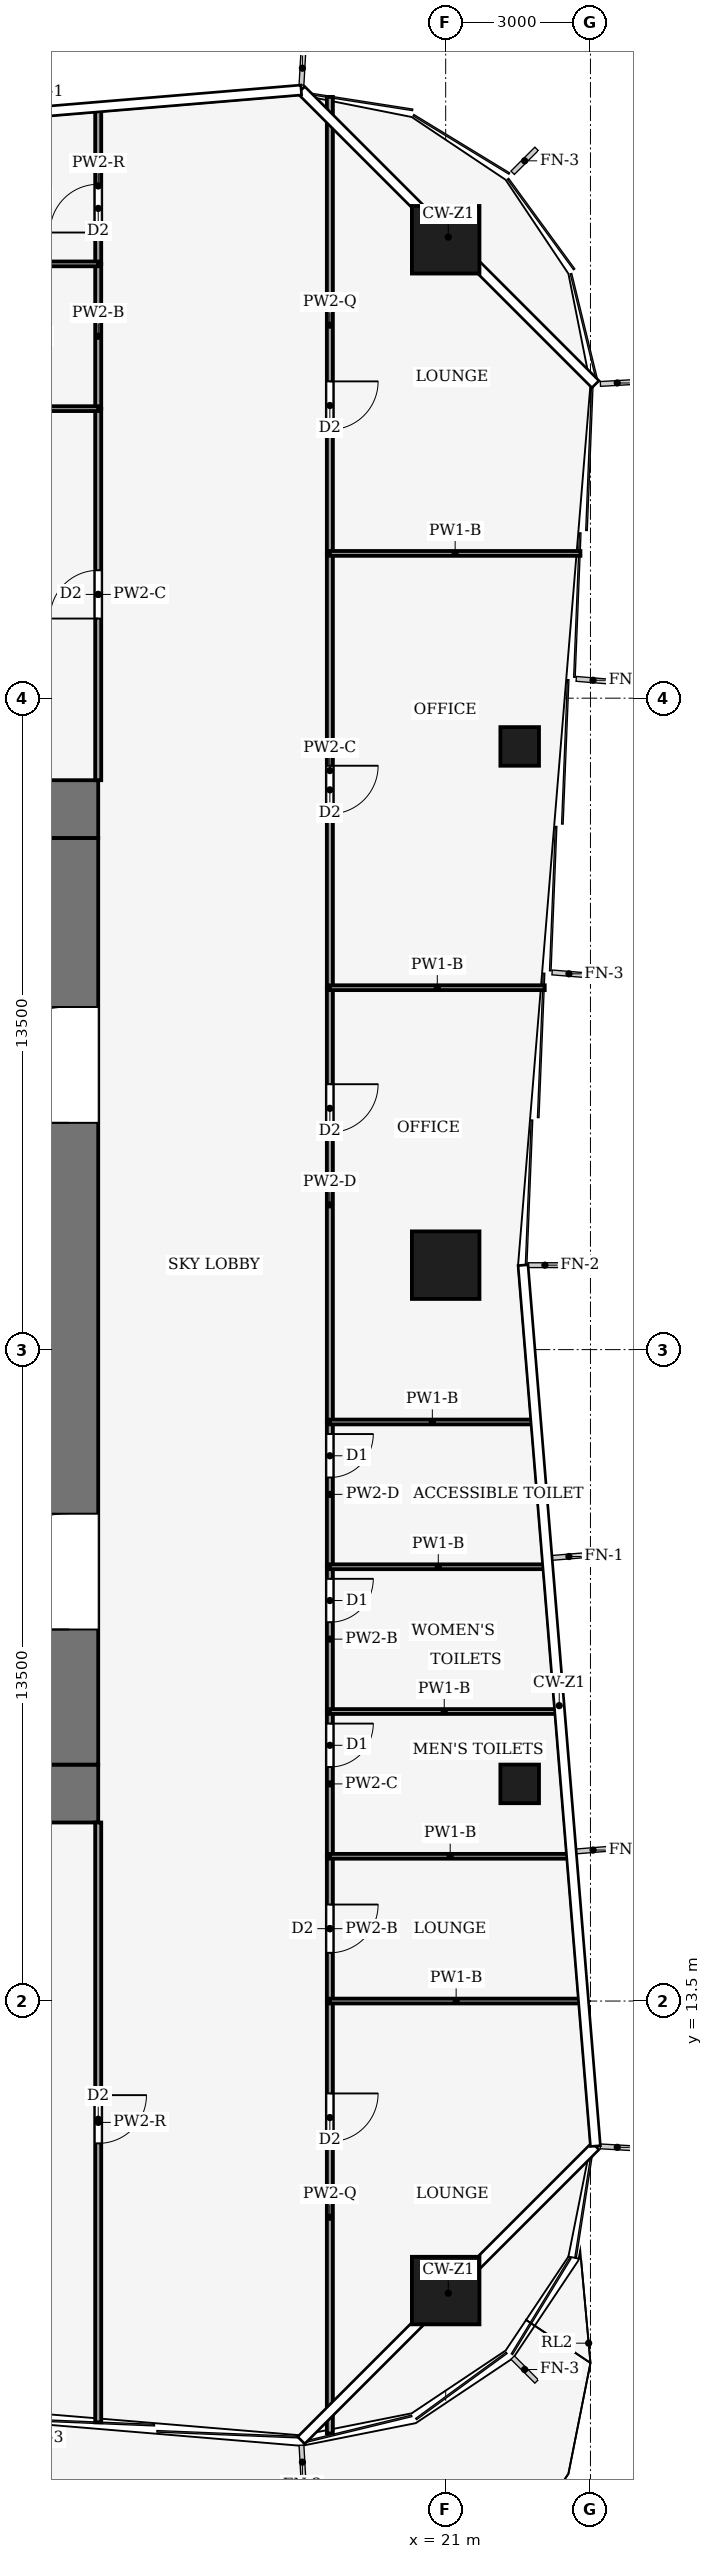
"""IFC4 building model, lengths in metres.
Left out: names, types, materials, properties, quantities, classifications, styles, units other than length and angle.
Written with IfcOpenShell. Run it as: python <this file> out.ifc"""

import sys

from ifc_helpers import new_model, si_unit, direction, frame, frame_2d, origin, origin_2d, place, context, subcontext, project, spatial, rectangle, hollow_rectangle, extrude, element, fill, save


model = new_model("IFC4")
c1 = context("Model", 3, precision=1e-05, world=origin(), true_north=direction((0.0, 1.0)))
c2 = subcontext(c1, "Body", "Model", "MODEL_VIEW")
j1 = project(units=[si_unit("LENGTHUNIT", "METRE"), si_unit("PLANEANGLEUNIT", "RADIAN")], contexts=[c1])
p1 = place(None, origin())
s1 = spatial("IfcSite", under=j1, at=p1, CompositionType="ELEMENT")
p2 = place(p1, origin())
s2 = spatial("IfcBuilding", under=s1, at=p2, CompositionType="ELEMENT")
p3 = place(p2, frame((0.0, 0.0, 65.0)))
s3 = spatial("IfcBuildingStorey", under=s2, at=p3, CompositionType="ELEMENT", Elevation=65.0)
for number, where, z_axis, x_axis in (
    (1, (-13.8, 17.8, -0.13), (0.0, 0.0, 1.0), (1.0, 0.0, 0.0)),
    (2, (-13.8, 38.2, -0.13), (0.0, 0.0, 1.0), (1.0, 0.0, 0.0)),
):
    element("IfcWall", number, at=place(p3, frame(where, z_axis=z_axis, x_axis=x_axis)), inside=s3, PredefinedType="SHEAR", context=c2, shape_type="SweptSolid", body=[
        extrude(rectangle(XDim=27.6, YDim=1.2, at=frame_2d((13.8, 0.0))), origin(), (0.0, 0.0, 1.0), 5.0),
    ])
p4 = place(p3, frame((13.2, 18.4, -0.13), z_axis=(0.0, 0.0, 1.0), x_axis=(0.0, 1.0, 0.0)))
e3 = element("IfcWall", 3, at=p4, inside=s3, PredefinedType="SHEAR", context=c2, shape_type="SweptSolid", body=[
    extrude(rectangle(XDim=19.2, YDim=1.2, at=frame_2d((9.6, 0.0))), origin(), (0.0, 0.0, 1.0), 5.0),
])
p5 = place(p4, frame((2.8, 0.0, 0.13)))
e4 = element("IfcOpeningElement", 4, at=p5, cuts=e3, PredefinedType="OPENING", context=c2, shape_type="SweptSolid", body=[
    extrude(rectangle(XDim=2.4, YDim=2.4, at=frame_2d((1.2, 1.2))), frame((0.0, 0.61, 0.0), z_axis=(0.0, -1.0, 0.0), x_axis=(1.0, 0.0, 0.0)), (0.0, 0.0, 1.0), 1.22),
])
p6 = place(p4, frame((13.3, 0.0, 0.13)))
e5 = element("IfcOpeningElement", 5, at=p6, cuts=e3, PredefinedType="OPENING", context=c2, shape_type="SweptSolid", body=[
    extrude(rectangle(XDim=2.4, YDim=2.4, at=frame_2d((1.2, 1.2))), frame((0.0, 0.61, 0.0), z_axis=(0.0, -1.0, 0.0), x_axis=(1.0, 0.0, 0.0)), (0.0, 0.0, 1.0), 1.22),
])
for number, where, z_axis, x_axis in (
    (6, (21.0, 50.0, 0.0), (0.0, 0.0, 1.0), (1.0, 0.0, 0.0)),
    (7, (21.0, 28.75, 0.0), (0.0, 0.0, 1.0), (1.0, 0.0, 0.0)),
    (8, (21.0, 7.5, 0.0), (0.0, 0.0, 1.0), (1.0, 0.0, 0.0)),
):
    element("IfcColumn", number, at=place(p3, frame(where, z_axis=z_axis, x_axis=x_axis)), inside=s3, PredefinedType="COLUMN", context=c2, shape_type="SweptSolid", body=[
        extrude(hollow_rectangle(XDim=1.4, YDim=1.4, WallThickness=0.08, at=origin_2d()), origin(), (0.0, 0.0, 1.0), 5.0),
    ])
for number, where, z_axis, x_axis in (
    (9, (22.534, 18.0, 0.0), (0.0, 0.0, 1.0), (1.0, 0.0, 0.0)),
    (10, (22.534, 39.5, 0.0), (0.0, 0.0, 1.0), (1.0, 0.0, 0.0)),
):
    element("IfcColumn", number, at=place(p3, frame(where, z_axis=z_axis, x_axis=x_axis)), inside=s3, PredefinedType="COLUMN", context=c2, shape_type="SweptSolid", body=[
        extrude(hollow_rectangle(XDim=0.8, YDim=0.8, WallThickness=0.04, at=origin_2d()), origin(), (0.0, 0.0, 1.0), 5.0),
    ])
p7 = place(p3, frame((18.6, 13.5, 0.0), z_axis=(0.0, 0.0, 1.0), x_axis=(0.0, -1.0, 0.0)))
e11 = element("IfcWall", 11, at=p7, inside=s3, PredefinedType="PARTITIONING", context=c2, shape_type="SweptSolid", body=[
    extrude(rectangle(XDim=8.961, YDim=0.125, at=frame_2d((4.48, 0.0))), origin(), (0.0, 0.0, 1.0), 3.93),
])
p8 = place(p7, frame((1.915, 0.0, 0.0)))
e12 = element("IfcOpeningElement", 12, at=p8, cuts=e11, PredefinedType="OPENING", context=c2, shape_type="SweptSolid", body=[
    extrude(rectangle(XDim=1.0, YDim=2.1, at=frame_2d((0.5, 1.05))), frame((0.0, 0.073, 0.0), z_axis=(0.0, -1.0, 0.0), x_axis=(1.0, 0.0, 0.0)), (0.0, 0.0, 1.0), 0.145),
])
p9 = place(p3, frame((18.6, 16.5, 0.0), z_axis=(0.0, 0.0, 1.0), x_axis=(0.0, -1.0, 0.0)))
e13 = element("IfcWall", 13, at=p9, inside=s3, PredefinedType="PARTITIONING", context=c2, shape_type="SweptSolid", body=[
    extrude(rectangle(XDim=3.0, YDim=0.125, at=frame_2d((1.5, 0.0))), origin(), (0.0, 0.0, 1.0), 4.87),
])
p10 = place(p9, frame((1.0, 0.0, 0.0)))
e14 = element("IfcOpeningElement", 14, at=p10, cuts=e13, PredefinedType="OPENING", context=c2, shape_type="SweptSolid", body=[
    extrude(rectangle(XDim=1.0, YDim=2.1, at=frame_2d((0.5, 1.05))), frame((0.0, 0.073, 0.0), z_axis=(0.0, -1.0, 0.0), x_axis=(1.0, 0.0, 0.0)), (0.0, 0.0, 1.0), 0.145),
])
p11 = place(p3, frame((18.6, 19.5, 0.0), z_axis=(0.0, 0.0, 1.0), x_axis=(0.0, -1.0, 0.0)))
e15 = element("IfcWall", 15, at=p11, inside=s3, PredefinedType="PARTITIONING", context=c2, shape_type="SweptSolid", body=[
    extrude(rectangle(XDim=3.0, YDim=0.125, at=frame_2d((1.5, 0.0))), origin(), (0.0, 0.0, 1.0), 4.14),
])
p12 = place(p11, frame((0.25, 0.0, 0.0)))
e16 = element("IfcOpeningElement", 16, at=p12, cuts=e15, PredefinedType="OPENING", context=c2, shape_type="SweptSolid", body=[
    extrude(rectangle(XDim=0.9, YDim=2.1, at=frame_2d((0.45, 1.05))), frame((0.0, 0.073, 0.0), z_axis=(0.0, -1.0, 0.0), x_axis=(1.0, 0.0, 0.0)), (0.0, 0.0, 1.0), 0.145),
])
p13 = place(p3, frame((18.6, 22.5, 0.0), z_axis=(0.0, 0.0, 1.0), x_axis=(0.0, -1.0, 0.0)))
e17 = element("IfcWall", 17, at=p13, inside=s3, PredefinedType="PARTITIONING", context=c2, shape_type="SweptSolid", body=[
    extrude(rectangle(XDim=3.0, YDim=0.125, at=frame_2d((1.5, 0.0))), origin(), (0.0, 0.0, 1.0), 4.87),
])
p14 = place(p13, frame((0.25, 0.0, 0.0)))
e18 = element("IfcOpeningElement", 18, at=p14, cuts=e17, PredefinedType="OPENING", context=c2, shape_type="SweptSolid", body=[
    extrude(rectangle(XDim=0.9, YDim=2.1, at=frame_2d((0.45, 1.05))), frame((0.0, 0.073, 0.0), z_axis=(0.0, -1.0, 0.0), x_axis=(1.0, 0.0, 0.0)), (0.0, 0.0, 1.0), 0.145),
])
p15 = place(p3, frame((18.6, 25.5, 0.0), z_axis=(0.0, 0.0, 1.0), x_axis=(0.0, -1.0, 0.0)))
e19 = element("IfcWall", 19, at=p15, inside=s3, PredefinedType="PARTITIONING", context=c2, shape_type="SweptSolid", body=[
    extrude(rectangle(XDim=3.0, YDim=0.125, at=frame_2d((1.5, 0.0))), origin(), (0.0, 0.0, 1.0), 4.48),
])
p16 = place(p15, frame((0.25, 0.0, 0.0)))
e20 = element("IfcOpeningElement", 20, at=p16, cuts=e19, PredefinedType="OPENING", context=c2, shape_type="SweptSolid", body=[
    extrude(rectangle(XDim=0.9, YDim=2.1, at=frame_2d((0.45, 1.05))), frame((0.0, 0.073, 0.0), z_axis=(0.0, -1.0, 0.0), x_axis=(1.0, 0.0, 0.0)), (0.0, 0.0, 1.0), 0.145),
])
p17 = place(p3, frame((18.6, 34.5, 0.0), z_axis=(0.0, 0.0, 1.0), x_axis=(0.0, -1.0, 0.0)))
e21 = element("IfcWall", 21, at=p17, inside=s3, PredefinedType="PARTITIONING", context=c2, shape_type="SweptSolid", body=[
    extrude(rectangle(XDim=9.0, YDim=0.125, at=frame_2d((4.5, 0.0))), origin(), (0.0, 0.0, 1.0), 4.48),
])
p18 = place(p17, frame((2.0, 0.0, 0.0)))
e22 = element("IfcOpeningElement", 22, at=p18, cuts=e21, PredefinedType="OPENING", context=c2, shape_type="SweptSolid", body=[
    extrude(rectangle(XDim=1.0, YDim=2.1, at=frame_2d((0.5, 1.05))), frame((0.0, 0.073, 0.0), z_axis=(0.0, -1.0, 0.0), x_axis=(1.0, 0.0, 0.0)), (0.0, 0.0, 1.0), 0.145),
])
p19 = place(p3, frame((18.6, 43.5, 0.0), z_axis=(0.0, 0.0, 1.0), x_axis=(0.0, -1.0, 0.0)))
e23 = element("IfcWall", 23, at=p19, inside=s3, PredefinedType="PARTITIONING", context=c2, shape_type="SweptSolid", body=[
    extrude(rectangle(XDim=9.0, YDim=0.125, at=frame_2d((4.5, 0.0))), origin(), (0.0, 0.0, 1.0), 4.14),
])
p20 = place(p19, frame((4.4, 0.0, 0.0)))
e24 = element("IfcOpeningElement", 24, at=p20, cuts=e23, PredefinedType="OPENING", context=c2, shape_type="SweptSolid", body=[
    extrude(rectangle(XDim=1.0, YDim=2.1, at=frame_2d((0.5, 1.05))), frame((0.0, 0.073, 0.0), z_axis=(0.0, -1.0, 0.0), x_axis=(1.0, 0.0, 0.0)), (0.0, 0.0, 1.0), 0.145),
])
p21 = place(p3, frame((18.6, 52.961, 0.0), z_axis=(0.0, 0.0, 1.0), x_axis=(0.0, -1.0, 0.0)))
e25 = element("IfcWall", 25, at=p21, inside=s3, PredefinedType="PARTITIONING", context=c2, shape_type="SweptSolid", body=[
    extrude(rectangle(XDim=9.461, YDim=0.125, at=frame_2d((4.73, 0.0))), origin(), (0.0, 0.0, 1.0), 3.93),
])
p22 = place(p21, frame((5.896, 0.0, 0.0)))
e26 = element("IfcOpeningElement", 26, at=p22, cuts=e25, PredefinedType="OPENING", context=c2, shape_type="SweptSolid", body=[
    extrude(rectangle(XDim=1.0, YDim=2.1, at=frame_2d((0.5, 1.05))), frame((0.0, 0.073, 0.0), z_axis=(0.0, -1.0, 0.0), x_axis=(1.0, 0.0, 0.0)), (0.0, 0.0, 1.0), 0.145),
])
p23 = place(p3, frame((13.8, 17.2, 0.0), z_axis=(0.0, 0.0, 1.0), x_axis=(0.0, -1.0, 0.0)))
e27 = element("IfcWall", 27, at=p23, inside=s3, PredefinedType="PARTITIONING", context=c2, shape_type="SweptSolid", body=[
    extrude(rectangle(XDim=12.43, YDim=0.125, at=frame_2d((6.215, 0.0))), origin(), (0.0, 0.0, 1.0), 4.04),
])
p24 = place(p23, frame((5.65, 0.0, 0.0)))
e28 = element("IfcOpeningElement", 28, at=p24, cuts=e27, PredefinedType="OPENING", context=c2, shape_type="SweptSolid", body=[
    extrude(rectangle(XDim=1.0, YDim=2.1, at=frame_2d((0.5, 1.05))), frame((0.0, 0.073, 0.0), z_axis=(0.0, -1.0, 0.0), x_axis=(1.0, 0.0, 0.0)), (0.0, 0.0, 1.0), 0.145),
])
p25 = place(p3, frame((13.8, 38.8, 0.0), z_axis=(0.0, 0.0, 1.0), x_axis=(0.0, 1.0, 0.0)))
e29 = element("IfcWall", 29, at=p25, inside=s3, PredefinedType="PARTITIONING", context=c2, shape_type="SweptSolid", body=[
    extrude(rectangle(XDim=7.7, YDim=0.125, at=frame_2d((3.85, 0.0))), origin(), (0.0, 0.0, 1.0), 4.14),
])
p26 = place(p25, frame((3.35, 0.0, 0.0)))
e30 = element("IfcOpeningElement", 30, at=p26, cuts=e29, PredefinedType="OPENING", context=c2, shape_type="SweptSolid", body=[
    extrude(rectangle(XDim=1.0, YDim=2.1, at=frame_2d((0.5, 1.05))), frame((0.0, 0.073, 0.0), z_axis=(0.0, -1.0, 0.0), x_axis=(1.0, 0.0, 0.0)), (0.0, 0.0, 1.0), 0.145),
])
p27 = place(p3, frame((13.8, 49.5, 0.0), z_axis=(0.0, 0.0, 1.0), x_axis=(0.0, -1.0, 0.0)))
e31 = element("IfcWall", 31, at=p27, inside=s3, PredefinedType="PARTITIONING", context=c2, shape_type="SweptSolid", body=[
    extrude(rectangle(XDim=3.0, YDim=0.125, at=frame_2d((1.5, 0.0))), origin(), (0.0, 0.0, 1.0), 4.87),
])
p28 = place(p3, frame((13.8, 49.5, 0.0), z_axis=(0.0, 0.0, 1.0), x_axis=(0.0, 1.0, 0.0)))
e32 = element("IfcWall", 32, at=p28, inside=s3, PredefinedType="PARTITIONING", context=c2, shape_type="SweptSolid", body=[
    extrude(rectangle(XDim=3.23, YDim=0.125, at=frame_2d((1.615, 0.0))), origin(), (0.0, 0.0, 1.0), 4.04),
])
p29 = place(p28, frame((0.65, 0.0, 0.0)))
e33 = element("IfcOpeningElement", 33, at=p29, cuts=e32, PredefinedType="OPENING", context=c2, shape_type="SweptSolid", body=[
    extrude(rectangle(XDim=1.0, YDim=2.1, at=frame_2d((0.5, 1.05))), frame((0.0, 0.073, 0.0), z_axis=(0.0, -1.0, 0.0), x_axis=(1.0, 0.0, 0.0)), (0.0, 0.0, 1.0), 0.145),
])
p30 = place(p3, frame((23.833, 13.5, 0.0), z_axis=(0.0, 0.0, 1.0), x_axis=(-1.0, 0.0, 0.0)))
e34 = element("IfcWall", 34, at=p30, inside=s3, PredefinedType="PARTITIONING", context=c2, shape_type="SweptSolid", body=[
    extrude(rectangle(XDim=5.233, YDim=0.1, at=frame_2d((2.617, 0.0))), origin(), (0.0, 0.0, 1.0), 4.04),
])
p31 = place(p3, frame((23.587, 16.5, 0.0), z_axis=(0.0, 0.0, 1.0), x_axis=(-1.0, 0.0, 0.0)))
e35 = element("IfcWall", 35, at=p31, inside=s3, PredefinedType="PARTITIONING", context=c2, shape_type="SweptSolid", body=[
    extrude(rectangle(XDim=4.987, YDim=0.1, at=frame_2d((2.493, 0.0))), origin(), (0.0, 0.0, 1.0), 4.04),
])
p32 = place(p3, frame((23.34, 19.5, 0.0), z_axis=(0.0, 0.0, 1.0), x_axis=(-1.0, 0.0, 0.0)))
e36 = element("IfcWall", 36, at=p32, inside=s3, PredefinedType="PARTITIONING", context=c2, shape_type="SweptSolid", body=[
    extrude(rectangle(XDim=4.74, YDim=0.1, at=frame_2d((2.37, 0.0))), origin(), (0.0, 0.0, 1.0), 4.04),
])
p33 = place(p3, frame((23.094, 22.5, 0.0), z_axis=(0.0, 0.0, 1.0), x_axis=(-1.0, 0.0, 0.0)))
e37 = element("IfcWall", 37, at=p33, inside=s3, PredefinedType="PARTITIONING", context=c2, shape_type="SweptSolid", body=[
    extrude(rectangle(XDim=4.494, YDim=0.1, at=frame_2d((2.247, 0.0))), origin(), (0.0, 0.0, 1.0), 4.04),
])
p34 = place(p3, frame((22.847, 25.5, 0.0), z_axis=(0.0, 0.0, 1.0), x_axis=(-1.0, 0.0, 0.0)))
e38 = element("IfcWall", 38, at=p34, inside=s3, PredefinedType="PARTITIONING", context=c2, shape_type="SweptSolid", body=[
    extrude(rectangle(XDim=4.247, YDim=0.1, at=frame_2d((2.124, 0.0))), origin(), (0.0, 0.0, 1.0), 4.04),
])
p35 = place(p3, frame((23.052, 34.5, 0.0), z_axis=(0.0, 0.0, 1.0), x_axis=(-1.0, 0.0, 0.0)))
e39 = element("IfcWall", 39, at=p35, inside=s3, PredefinedType="PARTITIONING", context=c2, shape_type="SweptSolid", body=[
    extrude(rectangle(XDim=4.452, YDim=0.1, at=frame_2d((2.226, 0.0))), origin(), (0.0, 0.0, 1.0), 4.04),
])
p36 = place(p3, frame((23.792, 43.5, 0.0), z_axis=(0.0, 0.0, 1.0), x_axis=(-1.0, 0.0, 0.0)))
e40 = element("IfcWall", 40, at=p36, inside=s3, PredefinedType="PARTITIONING", context=c2, shape_type="SweptSolid", body=[
    extrude(rectangle(XDim=5.192, YDim=0.1, at=frame_2d((2.596, 0.0))), origin(), (0.0, 0.0, 1.0), 4.04),
])
p37 = place(p3, frame((10.5, 46.5, 0.0), z_axis=(0.0, 0.0, 1.0), x_axis=(1.0, 0.0, 0.0)))
e41 = element("IfcWall", 41, at=p37, inside=s3, PredefinedType="PARTITIONING", context=c2, shape_type="SweptSolid", body=[
    extrude(rectangle(XDim=3.3, YDim=0.1, at=frame_2d((1.65, 0.0))), origin(), (0.0, 0.0, 1.0), 4.39),
])
p38 = place(p37, frame((1.15, 0.0, 0.0)))
e42 = element("IfcOpeningElement", 42, at=p38, cuts=e41, PredefinedType="OPENING", context=c2, shape_type="SweptSolid", body=[
    extrude(rectangle(XDim=1.0, YDim=2.1, at=frame_2d((0.5, 1.05))), frame((0.0, 0.06, 0.0), z_axis=(0.0, -1.0, 0.0), x_axis=(1.0, 0.0, 0.0)), (0.0, 0.0, 1.0), 0.12),
])
p39 = place(p3, frame((13.8, 49.5, 0.0), z_axis=(0.0, 0.0, 1.0), x_axis=(-1.0, 0.0, 0.0)))
e43 = element("IfcWall", 43, at=p39, inside=s3, PredefinedType="PARTITIONING", context=c2, shape_type="SweptSolid", body=[
    extrude(rectangle(XDim=3.3, YDim=0.1, at=frame_2d((1.65, 0.0))), origin(), (0.0, 0.0, 1.0), 4.39),
])
p40 = place(p5, origin())
e44 = element("IfcDoor", 44, at=p40, inside=s3, OperationType="DOUBLE_DOOR_SINGLE_SWING", PredefinedType="DOOR", context=c2, shape_type="SweptSolid", body=[
    extrude(rectangle(XDim=2.4, YDim=2.4, at=frame_2d((1.2, 1.2))), frame((0.0, 0.025, 0.0), z_axis=(0.0, -1.0, 0.0), x_axis=(1.0, 0.0, 0.0)), (0.0, 0.0, 1.0), 0.05),
])
fill(e4, e44)
p41 = place(p6, origin())
e45 = element("IfcDoor", 45, at=p41, inside=s3, OperationType="DOUBLE_DOOR_SINGLE_SWING", PredefinedType="DOOR", context=c2, shape_type="SweptSolid", body=[
    extrude(rectangle(XDim=2.4, YDim=2.4, at=frame_2d((1.2, 1.2))), frame((0.0, 0.025, 0.0), z_axis=(0.0, -1.0, 0.0), x_axis=(1.0, 0.0, 0.0)), (0.0, 0.0, 1.0), 0.05),
])
fill(e5, e45)
p42 = place(p8, origin())
e46 = element("IfcDoor", 46, at=p42, inside=s3, OperationType="SINGLE_SWING_LEFT", PredefinedType="DOOR", context=c2, shape_type="SweptSolid", body=[
    extrude(rectangle(XDim=1.0, YDim=2.1, at=frame_2d((0.5, 1.05))), frame((0.0, 0.025, 0.0), z_axis=(0.0, -1.0, 0.0), x_axis=(1.0, 0.0, 0.0)), (0.0, 0.0, 1.0), 0.05),
])
fill(e12, e46)
p43 = place(p10, origin())
e47 = element("IfcDoor", 47, at=p43, inside=s3, OperationType="SINGLE_SWING_LEFT", PredefinedType="DOOR", context=c2, shape_type="SweptSolid", body=[
    extrude(rectangle(XDim=1.0, YDim=2.1, at=frame_2d((0.5, 1.05))), frame((0.0, 0.025, 0.0), z_axis=(0.0, -1.0, 0.0), x_axis=(1.0, 0.0, 0.0)), (0.0, 0.0, 1.0), 0.05),
])
fill(e14, e47)
p44 = place(p12, origin())
e48 = element("IfcDoor", 48, at=p44, inside=s3, OperationType="SINGLE_SWING_LEFT", PredefinedType="DOOR", context=c2, shape_type="SweptSolid", body=[
    extrude(rectangle(XDim=0.9, YDim=2.1, at=frame_2d((0.45, 1.05))), frame((0.0, 0.025, 0.0), z_axis=(0.0, -1.0, 0.0), x_axis=(1.0, 0.0, 0.0)), (0.0, 0.0, 1.0), 0.05),
])
fill(e16, e48)
p45 = place(p14, origin())
e49 = element("IfcDoor", 49, at=p45, inside=s3, OperationType="SINGLE_SWING_LEFT", PredefinedType="DOOR", context=c2, shape_type="SweptSolid", body=[
    extrude(rectangle(XDim=0.9, YDim=2.1, at=frame_2d((0.45, 1.05))), frame((0.0, 0.025, 0.0), z_axis=(0.0, -1.0, 0.0), x_axis=(1.0, 0.0, 0.0)), (0.0, 0.0, 1.0), 0.05),
])
fill(e18, e49)
p46 = place(p16, origin())
e50 = element("IfcDoor", 50, at=p46, inside=s3, OperationType="SINGLE_SWING_LEFT", PredefinedType="DOOR", context=c2, shape_type="SweptSolid", body=[
    extrude(rectangle(XDim=0.9, YDim=2.1, at=frame_2d((0.45, 1.05))), frame((0.0, 0.025, 0.0), z_axis=(0.0, -1.0, 0.0), x_axis=(1.0, 0.0, 0.0)), (0.0, 0.0, 1.0), 0.05),
])
fill(e20, e50)
p47 = place(p18, origin())
e51 = element("IfcDoor", 51, at=p47, inside=s3, OperationType="SINGLE_SWING_LEFT", PredefinedType="DOOR", context=c2, shape_type="SweptSolid", body=[
    extrude(rectangle(XDim=1.0, YDim=2.1, at=frame_2d((0.5, 1.05))), frame((0.0, 0.025, 0.0), z_axis=(0.0, -1.0, 0.0), x_axis=(1.0, 0.0, 0.0)), (0.0, 0.0, 1.0), 0.05),
])
fill(e22, e51)
p48 = place(p20, origin())
e52 = element("IfcDoor", 52, at=p48, inside=s3, OperationType="SINGLE_SWING_RIGHT", PredefinedType="DOOR", context=c2, shape_type="SweptSolid", body=[
    extrude(rectangle(XDim=1.0, YDim=2.1, at=frame_2d((0.5, 1.05))), frame((0.0, 0.025, 0.0), z_axis=(0.0, -1.0, 0.0), x_axis=(1.0, 0.0, 0.0)), (0.0, 0.0, 1.0), 0.05),
])
fill(e24, e52)
p49 = place(p22, origin())
e53 = element("IfcDoor", 53, at=p49, inside=s3, OperationType="SINGLE_SWING_RIGHT", PredefinedType="DOOR", context=c2, shape_type="SweptSolid", body=[
    extrude(rectangle(XDim=1.0, YDim=2.1, at=frame_2d((0.5, 1.05))), frame((0.0, 0.025, 0.0), z_axis=(0.0, -1.0, 0.0), x_axis=(1.0, 0.0, 0.0)), (0.0, 0.0, 1.0), 0.05),
])
fill(e26, e53)
p50 = place(p24, origin())
e54 = element("IfcDoor", 54, at=p50, inside=s3, OperationType="SINGLE_SWING_LEFT", PredefinedType="DOOR", context=c2, shape_type="SweptSolid", body=[
    extrude(rectangle(XDim=1.0, YDim=2.1, at=frame_2d((0.5, 1.05))), frame((0.0, 0.025, 0.0), z_axis=(0.0, -1.0, 0.0), x_axis=(1.0, 0.0, 0.0)), (0.0, 0.0, 1.0), 0.05),
])
fill(e28, e54)
p51 = place(p26, origin())
e55 = element("IfcDoor", 55, at=p51, inside=s3, OperationType="SINGLE_SWING_LEFT", PredefinedType="DOOR", context=c2, shape_type="SweptSolid", body=[
    extrude(rectangle(XDim=1.0, YDim=2.1, at=frame_2d((0.5, 1.05))), frame((0.0, 0.025, 0.0), z_axis=(0.0, -1.0, 0.0), x_axis=(1.0, 0.0, 0.0)), (0.0, 0.0, 1.0), 0.05),
])
fill(e30, e55)
p52 = place(p29, origin())
e56 = element("IfcDoor", 56, at=p52, inside=s3, OperationType="SINGLE_SWING_LEFT", PredefinedType="DOOR", context=c2, shape_type="SweptSolid", body=[
    extrude(rectangle(XDim=1.0, YDim=2.1, at=frame_2d((0.5, 1.05))), frame((0.0, 0.025, 0.0), z_axis=(0.0, -1.0, 0.0), x_axis=(1.0, 0.0, 0.0)), (0.0, 0.0, 1.0), 0.05),
])
fill(e33, e56)
save(model, sys.argv[1])
